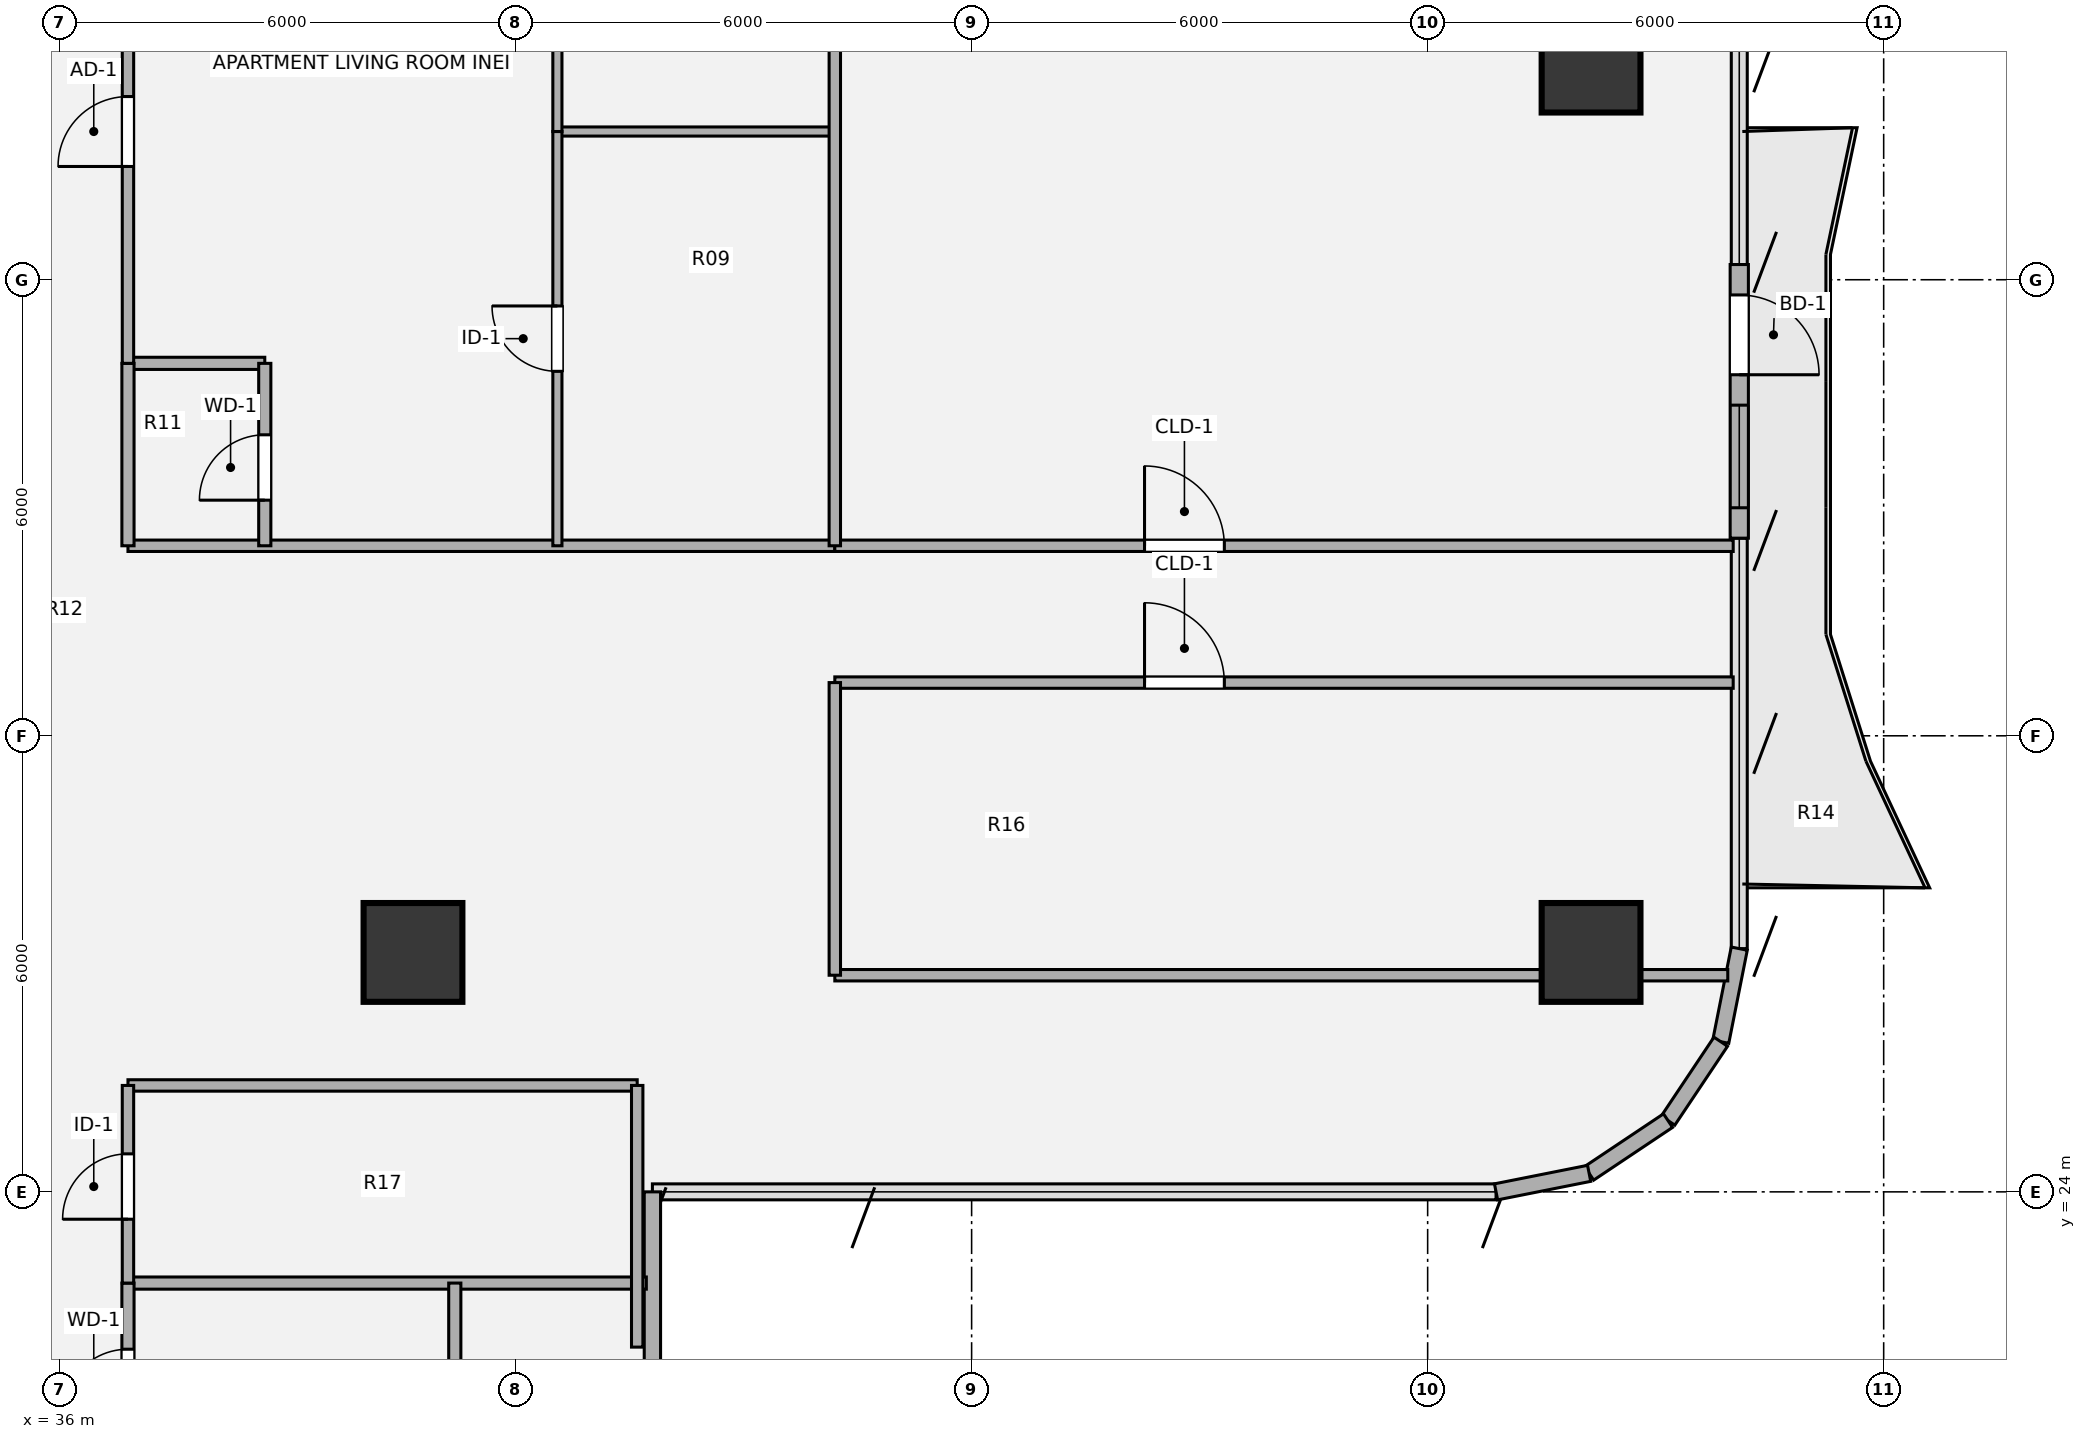
"""IFC4 building model, lengths in metres.
Left out: names, types, materials, properties, quantities, classifications, styles, units other than length and angle.
Written with IfcOpenShell. Run it as: python <this file> out.ifc"""

import sys

from ifc_helpers import new_model, si_unit, direction, frame, frame_2d, origin, origin_2d, place, context, subcontext, project, spatial, rectangle, hollow_circle, extrude, source, transform, mapped, element, fill, save


model = new_model("IFC4")
c1 = context("Model", 3, precision=1e-05, world=origin(), true_north=direction((0.0, 1.0)))
c2 = subcontext(c1, "Body", "Model", "MODEL_VIEW")
j1 = project(units=[si_unit("LENGTHUNIT", "METRE"), si_unit("PLANEANGLEUNIT", "RADIAN")], contexts=[c1])
p1 = place(None, origin())
s1 = spatial("IfcSite", under=j1, at=p1, CompositionType="ELEMENT")
p2 = place(p1, origin())
s2 = spatial("IfcBuilding", under=s1, at=p2, CompositionType="ELEMENT")
p3 = place(p2, frame((0.0, 0.0, 142.74)))
s3 = spatial("IfcBuildingStorey", under=s2, at=p3, CompositionType="ELEMENT", Elevation=142.74)
m1 = source(origin(), c2, "Body", "SweptSolid", [
    extrude(hollow_circle(Radius=0.65, WallThickness=0.045, at=origin_2d()), origin(), (0.0, 0.0, 1.0), 3.372),
])
for number, where, z_axis, x_axis in (
    (1, (56.15, 27.15, 0.0), (0.0, 0.0, 1.0), (1.0, 0.0, 0.0)),
    (2, (56.15, 38.85, 0.0), (0.0, 0.0, 1.0), (1.0, 0.0, 0.0)),
    (3, (40.65, 27.15, 0.0), (0.0, 0.0, 1.0), (1.0, 0.0, 0.0)),
):
    element("IfcColumn", number, at=place(p3, frame(where, z_axis=z_axis, x_axis=x_axis)), inside=s3, PredefinedType="COLUMN", context=c2, shape_type="MappedRepresentation", body=[
        mapped(m1, transform((0.0, 0.0, 0.0), x_axis=(1.0, 0.0, 0.0), y_axis=(0.0, 1.0, 0.0), z_axis=(0.0, 0.0, 1.0), scale=1.0)),
    ])
p4 = place(p3, frame((58.1, 36.2, 0.0), z_axis=(0.0, 0.0, 1.0), x_axis=(0.0, -1.0, 0.0)))
e4 = element("IfcWall", 4, at=p4, inside=s3, PredefinedType="SOLIDWALL", context=c2, shape_type="SweptSolid", body=[
    extrude(rectangle(XDim=3.6, YDim=0.24, at=frame_2d((1.8, 0.0))), origin(), (0.0, 0.0, 1.0), 3.372),
])
p5 = place(p4, frame((0.4, 0.0, 0.0)))
e5 = element("IfcOpeningElement", 5, at=p5, cuts=e4, PredefinedType="OPENING", context=c2, shape_type="SweptSolid", body=[
    extrude(rectangle(XDim=1.05, YDim=2.15, at=origin_2d()), frame((0.525, 0.13, 1.075), z_axis=(0.0, -1.0, 0.0), x_axis=(1.0, 0.0, 0.0)), (0.0, 0.0, 1.0), 0.26),
])
p6 = place(p4, frame((1.85, 0.0, 0.85)))
e6 = element("IfcOpeningElement", 6, at=p6, cuts=e4, PredefinedType="OPENING", context=c2, shape_type="SweptSolid", body=[
    extrude(rectangle(XDim=1.35, YDim=1.35, at=origin_2d()), frame((0.675, 0.13, 0.675), z_axis=(0.0, -1.0, 0.0), x_axis=(1.0, 0.0, 0.0)), (0.0, 0.0, 1.0), 0.26),
])
for number, where, z_axis, x_axis in (
    (7, (58.1, 27.2, 0.0), (0.0, 0.0, 1.0), (-0.195, -0.981, 0.0)),
    (8, (57.856, 25.975, 0.0), (0.0, 0.0, 1.0), (-0.556, -0.831, 0.0)),
    (9, (57.163, 24.937, 0.0), (0.0, 0.0, 1.0), (-0.831, -0.556, 0.0)),
    (10, (56.125, 24.244, 0.0), (0.0, 0.0, 1.0), (-0.981, -0.195, 0.0)),
):
    element("IfcWall", number, at=place(p3, frame(where, z_axis=z_axis, x_axis=x_axis)), inside=s3, PredefinedType="SOLIDWALL", context=c2, shape_type="SweptSolid", body=[
        extrude(rectangle(XDim=1.249, YDim=0.215, at=frame_2d((0.624, 0.0))), origin(), (0.0, 0.0, 1.0), 3.372),
    ])
p7 = place(p3, frame((43.8, 24.0, 0.0), z_axis=(0.0, 0.0, 1.0), x_axis=(0.0, -1.0, 0.0)))
e11 = element("IfcWall", 11, at=p7, inside=s3, PredefinedType="SOLIDWALL", context=c2, shape_type="SweptSolid", body=[
    extrude(rectangle(XDim=2.6, YDim=0.215, at=frame_2d((1.3, 0.0))), origin(), (0.0, 0.0, 1.0), 3.372),
])
p8 = place(p3, frame((36.9, 22.8, 0.0), z_axis=(0.0, 0.0, 1.0), x_axis=(1.0, 0.0, 0.0)))
e12 = element("IfcWall", 12, at=p8, inside=s3, PredefinedType="PLUMBINGWALL", context=c2, shape_type="SweptSolid", body=[
    extrude(rectangle(XDim=6.82, YDim=0.16, at=frame_2d((3.41, 0.0))), origin(), (0.0, 0.0, 1.0), 3.342),
])
p9 = place(p3, frame((36.9, 25.4, 0.0), z_axis=(0.0, 0.0, 1.0), x_axis=(1.0, 0.0, 0.0)))
e13 = element("IfcWall", 13, at=p9, inside=s3, PredefinedType="PARTITIONING", context=c2, shape_type="SweptSolid", body=[
    extrude(rectangle(XDim=6.7, YDim=0.15, at=frame_2d((3.35, 0.0))), origin(), (0.0, 0.0, 1.0), 3.342),
])
p10 = place(p3, frame((46.2, 26.85, 0.0), z_axis=(0.0, 0.0, 1.0), x_axis=(1.0, 0.0, 0.0)))
e14 = element("IfcWall", 14, at=p10, inside=s3, PredefinedType="PARTITIONING", context=c2, shape_type="SweptSolid", body=[
    extrude(rectangle(XDim=11.749, YDim=0.15, at=frame_2d((5.875, 0.0))), origin(), (0.0, 0.0, 1.0), 1.857),
])
p11 = place(p3, frame((46.2, 30.7, 0.0), z_axis=(0.0, 0.0, 1.0), x_axis=(1.0, 0.0, 0.0)))
e15 = element("IfcWall", 15, at=p11, inside=s3, PredefinedType="PARTITIONING", context=c2, shape_type="SweptSolid", body=[
    extrude(rectangle(XDim=11.82, YDim=0.15, at=frame_2d((5.91, 0.0))), origin(), (0.0, 0.0, 1.0), 2.897),
])
p12 = place(p11, frame((4.075, 0.0, 0.0)))
e16 = element("IfcOpeningElement", 16, at=p12, cuts=e15, PredefinedType="OPENING", context=c2, shape_type="SweptSolid", body=[
    extrude(rectangle(XDim=1.05, YDim=2.1, at=origin_2d()), frame((0.525, 0.085, 1.05), z_axis=(0.0, -1.0, 0.0), x_axis=(1.0, 0.0, 0.0)), (0.0, 0.0, 1.0), 0.17),
])
p13 = place(p3, frame((36.9, 32.5, 0.0), z_axis=(0.0, 0.0, 1.0), x_axis=(1.0, 0.0, 0.0)))
e17 = element("IfcWall", 17, at=p13, inside=s3, PredefinedType="PARTITIONING", context=c2, shape_type="SweptSolid", body=[
    extrude(rectangle(XDim=9.3, YDim=0.15, at=frame_2d((4.65, 0.0))), origin(), (0.0, 0.0, 1.0), 2.824),
])
p14 = place(p3, frame((46.2, 32.5, 0.0), z_axis=(0.0, 0.0, 1.0), x_axis=(1.0, 0.0, 0.0)))
e18 = element("IfcWall", 18, at=p14, inside=s3, PredefinedType="PARTITIONING", context=c2, shape_type="SweptSolid", body=[
    extrude(rectangle(XDim=11.82, YDim=0.15, at=frame_2d((5.91, 0.0))), origin(), (0.0, 0.0, 1.0), 2.824),
])
p15 = place(p14, frame((4.075, 0.0, 0.0)))
e19 = element("IfcOpeningElement", 19, at=p15, cuts=e18, PredefinedType="OPENING", context=c2, shape_type="SweptSolid", body=[
    extrude(rectangle(XDim=1.05, YDim=2.1, at=origin_2d()), frame((0.525, 0.085, 1.05), z_axis=(0.0, -1.0, 0.0), x_axis=(1.0, 0.0, 0.0)), (0.0, 0.0, 1.0), 0.17),
])
p16 = place(p3, frame((36.9, 34.9, 0.0), z_axis=(0.0, 0.0, 1.0), x_axis=(1.0, 0.0, 0.0)))
e20 = element("IfcWall", 20, at=p16, inside=s3, PredefinedType="PLUMBINGWALL", context=c2, shape_type="SweptSolid", body=[
    extrude(rectangle(XDim=1.8, YDim=0.16, at=frame_2d((0.9, 0.0))), origin(), (0.0, 0.0, 1.0), 3.101),
])
p17 = place(p3, frame((42.55, 37.95, 0.0), z_axis=(0.0, 0.0, 1.0), x_axis=(1.0, 0.0, 0.0)))
e21 = element("IfcWall", 21, at=p17, inside=s3, PredefinedType="PARTITIONING", context=c2, shape_type="SweptSolid", body=[
    extrude(rectangle(XDim=3.65, YDim=0.12, at=frame_2d((1.825, 0.0))), origin(), (0.0, 0.0, 1.0), 3.342),
])
p18 = place(p3, frame((36.9, 20.2, 0.0), z_axis=(0.0, 0.0, 1.0), x_axis=(0.0, 1.0, 0.0)))
e22 = element("IfcWall", 22, at=p18, inside=s3, PredefinedType="PLUMBINGWALL", context=c2, shape_type="SweptSolid", body=[
    extrude(rectangle(XDim=2.6, YDim=0.16, at=frame_2d((1.3, 0.0))), origin(), (0.0, 0.0, 1.0), 3.342),
])
p19 = place(p18, frame((0.87, 0.0, 0.0)))
e23 = element("IfcOpeningElement", 23, at=p19, cuts=e22, PredefinedType="OPENING", context=c2, shape_type="SweptSolid", body=[
    extrude(rectangle(XDim=0.86, YDim=2.1, at=origin_2d()), frame((0.43, 0.09, 1.05), z_axis=(0.0, -1.0, 0.0), x_axis=(1.0, 0.0, 0.0)), (0.0, 0.0, 1.0), 0.18),
])
p20 = place(p3, frame((36.9, 22.8, 0.0), z_axis=(0.0, 0.0, 1.0), x_axis=(0.0, 1.0, 0.0)))
e24 = element("IfcWall", 24, at=p20, inside=s3, PredefinedType="PARTITIONING", context=c2, shape_type="SweptSolid", body=[
    extrude(rectangle(XDim=2.6, YDim=0.15, at=frame_2d((1.3, 0.0))), origin(), (0.0, 0.0, 1.0), 3.342),
])
p21 = place(p20, frame((0.84, 0.0, 0.0)))
e25 = element("IfcOpeningElement", 25, at=p21, cuts=e24, PredefinedType="OPENING", context=c2, shape_type="SweptSolid", body=[
    extrude(rectangle(XDim=0.86, YDim=2.1, at=origin_2d()), frame((0.43, 0.085, 1.05), z_axis=(0.0, -1.0, 0.0), x_axis=(1.0, 0.0, 0.0)), (0.0, 0.0, 1.0), 0.17),
])
p22 = place(p3, frame((36.9, 32.5, 0.0), z_axis=(0.0, 0.0, 1.0), x_axis=(0.0, 1.0, 0.0)))
e26 = element("IfcWall", 26, at=p22, inside=s3, PredefinedType="PLUMBINGWALL", context=c2, shape_type="SweptSolid", body=[
    extrude(rectangle(XDim=2.4, YDim=0.16, at=frame_2d((1.2, 0.0))), origin(), (0.0, 0.0, 1.0), 3.342),
])
p23 = place(p3, frame((36.9, 34.9, 0.0), z_axis=(0.0, 0.0, 1.0), x_axis=(0.0, 1.0, 0.0)))
e27 = element("IfcWall", 27, at=p23, inside=s3, PredefinedType="PARTITIONING", context=c2, shape_type="SweptSolid", body=[
    extrude(rectangle(XDim=6.1, YDim=0.15, at=frame_2d((3.05, 0.0))), origin(), (0.0, 0.0, 1.0), 3.342),
])
p24 = place(p23, frame((2.59, 0.0, 0.0)))
e28 = element("IfcOpeningElement", 28, at=p24, cuts=e27, PredefinedType="OPENING", context=c2, shape_type="SweptSolid", body=[
    extrude(rectangle(XDim=0.92, YDim=2.1, at=origin_2d()), frame((0.46, 0.085, 1.05), z_axis=(0.0, -1.0, 0.0), x_axis=(1.0, 0.0, 0.0)), (0.0, 0.0, 1.0), 0.17),
])
p25 = place(p3, frame((38.7, 32.5, 0.0), z_axis=(0.0, 0.0, 1.0), x_axis=(0.0, 1.0, 0.0)))
e29 = element("IfcWall", 29, at=p25, inside=s3, PredefinedType="PLUMBINGWALL", context=c2, shape_type="SweptSolid", body=[
    extrude(rectangle(XDim=2.4, YDim=0.16, at=frame_2d((1.2, 0.0))), origin(), (0.0, 0.0, 1.0), 3.342),
])
p26 = place(p25, frame((0.6, 0.0, 0.0)))
e30 = element("IfcOpeningElement", 30, at=p26, cuts=e29, PredefinedType="OPENING", context=c2, shape_type="SweptSolid", body=[
    extrude(rectangle(XDim=0.86, YDim=2.1, at=origin_2d()), frame((0.43, 0.09, 1.05), z_axis=(0.0, -1.0, 0.0), x_axis=(1.0, 0.0, 0.0)), (0.0, 0.0, 1.0), 0.18),
])
p27 = place(p3, frame((41.2, 20.2, 0.0), z_axis=(0.0, 0.0, 1.0), x_axis=(0.0, 1.0, 0.0)))
e31 = element("IfcWall", 31, at=p27, inside=s3, PredefinedType="PLUMBINGWALL", context=c2, shape_type="SweptSolid", body=[
    extrude(rectangle(XDim=2.6, YDim=0.16, at=frame_2d((1.3, 0.0))), origin(), (0.0, 0.0, 1.0), 1.857),
])
p28 = place(p3, frame((42.55, 32.5, 0.0), z_axis=(0.0, 0.0, 1.0), x_axis=(0.0, 1.0, 0.0)))
e32 = element("IfcWall", 32, at=p28, inside=s3, PredefinedType="PARTITIONING", context=c2, shape_type="SweptSolid", body=[
    extrude(rectangle(XDim=5.45, YDim=0.12, at=frame_2d((2.725, 0.0))), origin(), (0.0, 0.0, 1.0), 3.342),
])
p29 = place(p28, frame((2.295, 0.0, 0.0)))
e33 = element("IfcOpeningElement", 33, at=p29, cuts=e32, PredefinedType="OPENING", context=c2, shape_type="SweptSolid", body=[
    extrude(rectangle(XDim=0.86, YDim=2.1, at=origin_2d()), frame((0.43, 0.07, 1.05), z_axis=(0.0, -1.0, 0.0), x_axis=(1.0, 0.0, 0.0)), (0.0, 0.0, 1.0), 0.14),
])
p30 = place(p3, frame((42.55, 37.95, 0.0), z_axis=(0.0, 0.0, 1.0), x_axis=(0.0, 1.0, 0.0)))
e34 = element("IfcWall", 34, at=p30, inside=s3, PredefinedType="PARTITIONING", context=c2, shape_type="SweptSolid", body=[
    extrude(rectangle(XDim=5.45, YDim=0.12, at=frame_2d((2.725, 0.0))), origin(), (0.0, 0.0, 1.0), 3.342),
])
p31 = place(p30, frame((2.295, 0.0, 0.0)))
e35 = element("IfcOpeningElement", 35, at=p31, cuts=e34, PredefinedType="OPENING", context=c2, shape_type="SweptSolid", body=[
    extrude(rectangle(XDim=0.86, YDim=2.1, at=origin_2d()), frame((0.43, 0.07, 1.05), z_axis=(0.0, -1.0, 0.0), x_axis=(1.0, 0.0, 0.0)), (0.0, 0.0, 1.0), 0.14),
])
p32 = place(p3, frame((43.6, 21.958, 0.0), z_axis=(0.0, 0.0, 1.0), x_axis=(0.0, 1.0, 0.0)))
e36 = element("IfcWall", 36, at=p32, inside=s3, PredefinedType="PARTITIONING", context=c2, shape_type="SweptSolid", body=[
    extrude(rectangle(XDim=3.442, YDim=0.15, at=frame_2d((1.721, 0.0))), origin(), (0.0, 0.0, 1.0), 3.342),
])
p33 = place(p3, frame((46.2, 26.85, 0.0), z_axis=(0.0, 0.0, 1.0), x_axis=(0.0, 1.0, 0.0)))
e37 = element("IfcWall", 37, at=p33, inside=s3, PredefinedType="PARTITIONING", context=c2, shape_type="SweptSolid", body=[
    extrude(rectangle(XDim=3.85, YDim=0.15, at=frame_2d((1.925, 0.0))), origin(), (0.0, 0.0, 1.0), 3.342),
])
p34 = place(p3, frame((46.2, 32.5, 0.0), z_axis=(0.0, 0.0, 1.0), x_axis=(0.0, 1.0, 0.0)))
e38 = element("IfcWall", 38, at=p34, inside=s3, PredefinedType="PARTITIONING", context=c2, shape_type="SweptSolid", body=[
    extrude(rectangle(XDim=14.821, YDim=0.15, at=frame_2d((7.411, 0.0))), origin(), (0.0, 0.0, 1.0), 3.342),
])
m2 = source(origin(), c2, "Body", "SweptSolid", [
    extrude(rectangle(XDim=1.05, YDim=2.15, at=origin_2d()), frame((0.525, 0.025, 1.075), z_axis=(0.0, -1.0, 0.0), x_axis=(1.0, 0.0, 0.0)), (0.0, 0.0, 1.0), 0.05),
])
p35 = place(p5, origin())
e39 = element("IfcDoor", 39, at=p35, inside=s3, OperationType="SINGLE_SWING_RIGHT", PredefinedType="DOOR", context=c2, shape_type="MappedRepresentation", body=[
    mapped(m2, transform((0.0, 0.0, 0.0), x_axis=(1.0, 0.0, 0.0), y_axis=(0.0, 1.0, 0.0), z_axis=(0.0, 0.0, 1.0), scale=1.0)),
])
fill(e5, e39)
m3 = source(origin(), c2, "Body", "SweptSolid", [
    extrude(rectangle(XDim=1.35, YDim=1.35, at=origin_2d()), frame((0.675, 0.03, 0.675), z_axis=(0.0, -1.0, 0.0), x_axis=(1.0, 0.0, 0.0)), (0.0, 0.0, 1.0), 0.06),
])
p36 = place(p6, origin())
e40 = element("IfcWindow", 40, at=p36, inside=s3, PartitioningType="SINGLE_PANEL", PredefinedType="WINDOW", context=c2, shape_type="MappedRepresentation", body=[
    mapped(m3, transform((0.0, 0.0, 0.0), x_axis=(1.0, 0.0, 0.0), y_axis=(0.0, 1.0, 0.0), z_axis=(0.0, 0.0, 1.0), scale=1.0)),
])
fill(e6, e40)
m4 = source(origin(), c2, "Body", "SweptSolid", [
    extrude(rectangle(XDim=1.05, YDim=2.1, at=origin_2d()), frame((0.525, 0.025, 1.05), z_axis=(0.0, -1.0, 0.0), x_axis=(1.0, 0.0, 0.0)), (0.0, 0.0, 1.0), 0.05),
])
p37 = place(p12, origin())
e41 = element("IfcDoor", 41, at=p37, inside=s3, OperationType="SINGLE_SWING_LEFT", PredefinedType="DOOR", context=c2, shape_type="MappedRepresentation", body=[
    mapped(m4, transform((0.0, 0.0, 0.0), x_axis=(1.0, 0.0, 0.0), y_axis=(0.0, 1.0, 0.0), z_axis=(0.0, 0.0, 1.0), scale=1.0)),
])
fill(e16, e41)
p38 = place(p15, origin())
e42 = element("IfcDoor", 42, at=p38, inside=s3, OperationType="SINGLE_SWING_LEFT", PredefinedType="DOOR", context=c2, shape_type="MappedRepresentation", body=[
    mapped(m4, transform((0.0, 0.0, 0.0), x_axis=(1.0, 0.0, 0.0), y_axis=(0.0, 1.0, 0.0), z_axis=(0.0, 0.0, 1.0), scale=1.0)),
])
fill(e19, e42)
m5 = source(origin(), c2, "Body", "SweptSolid", [
    extrude(rectangle(XDim=0.86, YDim=2.1, at=origin_2d()), frame((0.43, 0.025, 1.05), z_axis=(0.0, -1.0, 0.0), x_axis=(1.0, 0.0, 0.0)), (0.0, 0.0, 1.0), 0.05),
])
p39 = place(p19, origin())
e43 = element("IfcDoor", 43, at=p39, inside=s3, OperationType="SINGLE_SWING_LEFT", PredefinedType="DOOR", context=c2, shape_type="MappedRepresentation", body=[
    mapped(m5, transform((0.0, 0.0, 0.0), x_axis=(1.0, 0.0, 0.0), y_axis=(0.0, 1.0, 0.0), z_axis=(0.0, 0.0, 1.0), scale=1.0)),
])
fill(e23, e43)
m6 = source(origin(), c2, "Body", "SweptSolid", [
    extrude(rectangle(XDim=0.86, YDim=2.1, at=origin_2d()), frame((0.43, 0.025, 1.05), z_axis=(0.0, -1.0, 0.0), x_axis=(1.0, 0.0, 0.0)), (0.0, 0.0, 1.0), 0.05),
])
p40 = place(p21, origin())
e44 = element("IfcDoor", 44, at=p40, inside=s3, OperationType="SINGLE_SWING_LEFT", PredefinedType="DOOR", context=c2, shape_type="MappedRepresentation", body=[
    mapped(m6, transform((0.0, 0.0, 0.0), x_axis=(1.0, 0.0, 0.0), y_axis=(0.0, 1.0, 0.0), z_axis=(0.0, 0.0, 1.0), scale=1.0)),
])
fill(e25, e44)
m7 = source(origin(), c2, "Body", "SweptSolid", [
    extrude(rectangle(XDim=0.92, YDim=2.1, at=origin_2d()), frame((0.46, 0.025, 1.05), z_axis=(0.0, -1.0, 0.0), x_axis=(1.0, 0.0, 0.0)), (0.0, 0.0, 1.0), 0.05),
])
p41 = place(p24, origin())
e45 = element("IfcDoor", 45, at=p41, inside=s3, OperationType="SINGLE_SWING_LEFT", PredefinedType="DOOR", context=c2, shape_type="MappedRepresentation", body=[
    mapped(m7, transform((0.0, 0.0, 0.0), x_axis=(1.0, 0.0, 0.0), y_axis=(0.0, 1.0, 0.0), z_axis=(0.0, 0.0, 1.0), scale=1.0)),
])
fill(e28, e45)
p42 = place(p26, origin())
e46 = element("IfcDoor", 46, at=p42, inside=s3, OperationType="SINGLE_SWING_LEFT", PredefinedType="DOOR", context=c2, shape_type="MappedRepresentation", body=[
    mapped(m5, transform((0.0, 0.0, 0.0), x_axis=(1.0, 0.0, 0.0), y_axis=(0.0, 1.0, 0.0), z_axis=(0.0, 0.0, 1.0), scale=1.0)),
])
fill(e30, e46)
p43 = place(p29, origin())
e47 = element("IfcDoor", 47, at=p43, inside=s3, OperationType="SINGLE_SWING_RIGHT", PredefinedType="DOOR", context=c2, shape_type="MappedRepresentation", body=[
    mapped(m6, transform((0.0, 0.0, 0.0), x_axis=(1.0, 0.0, 0.0), y_axis=(0.0, 1.0, 0.0), z_axis=(0.0, 0.0, 1.0), scale=1.0)),
])
fill(e33, e47)
save(model, sys.argv[1])
